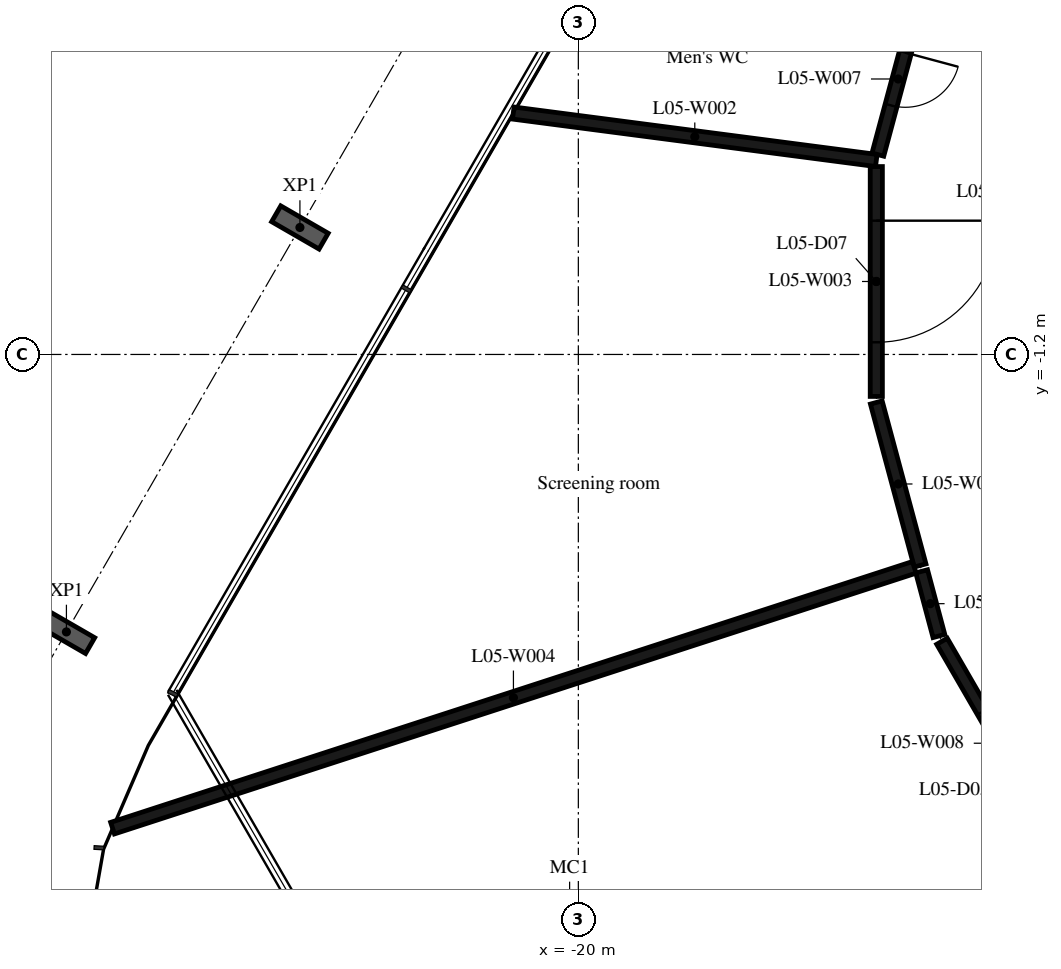
"""IFC4 building model, lengths in metres.
Left out: names, types, materials, properties, quantities, classifications, styles, units other than length and angle.
Written with IfcOpenShell. Run it as: python <this file> out.ifc"""

import sys

from ifc_helpers import new_model, si_unit, direction, frame, frame_2d, origin, origin_2d, place, context, subcontext, project, spatial, rectangle, i_section, extrude, element, fill, save


model = new_model("IFC4")
c1 = context("Model", 3, precision=1e-05, world=origin(), true_north=direction((0.0, 1.0)))
c2 = subcontext(c1, "Body", "Model", "MODEL_VIEW")
j1 = project(units=[si_unit("LENGTHUNIT", "METRE"), si_unit("PLANEANGLEUNIT", "RADIAN")], contexts=[c1])
p1 = place(None, origin())
s1 = spatial("IfcSite", under=j1, at=p1, CompositionType="ELEMENT")
p2 = place(p1, origin())
s2 = spatial("IfcBuilding", under=s1, at=p2, CompositionType="ELEMENT")
p3 = place(p2, frame((0.0, 0.0, 28.2)))
s3 = spatial("IfcBuildingStorey", under=s2, at=p3, CompositionType="ELEMENT", Elevation=28.2)
for number, where, z_axis, x_axis in (
    (1, (-24.579, 0.888, -0.38), (0.0, 0.0, 1.0), (0.5, 0.866, 0.0)),
    (2, (-28.419, -5.763, -0.38), (0.0, 0.0, 1.0), (0.5, 0.866, 0.0)),
):
    element("IfcColumn", number, at=place(p3, frame(where, z_axis=z_axis, x_axis=x_axis)), inside=s3, PredefinedType="COLUMN", context=c2, shape_type="SweptSolid", body=[
        extrude(i_section(OverallWidth=0.3, OverallDepth=0.9, WebThickness=0.019, FlangeThickness=0.035, FilletRadius=0.03, at=origin_2d()), origin(), (0.0, 0.0, 1.0), 4.73),
    ])
p4 = place(p3, frame((-15.1, -1.99, 0.0), z_axis=(0.0, 0.0, 1.0), x_axis=(0.259534891826, -0.96573373138, 0.0)))
e3 = element("IfcWall", 3, at=p4, inside=s3, PredefinedType="PARTITIONING", context=c2, shape_type="SweptSolid", body=[
    extrude(rectangle(XDim=2.775, YDim=0.2, at=frame_2d((1.387, 0.0))), origin(), (0.0, 0.0, 1.0), 4.35),
])
p5 = place(p3, frame((-15.1, 1.99, 0.0), z_axis=(0.0, 0.0, 1.0), x_axis=(-0.991571896529, 0.129557608858, 0.0)))
e4 = element("IfcWall", 4, at=p5, inside=s3, PredefinedType="PARTITIONING", context=c2, shape_type="SweptSolid", body=[
    extrude(rectangle(XDim=6.021, YDim=0.2, at=frame_2d((3.01, 0.0))), origin(), (0.0, 0.0, 1.0), 4.35),
])
p6 = place(p3, frame((-15.1, 1.89, 0.0), z_axis=(0.0, 0.0, 1.0), x_axis=(0.0, -1.0, 0.0)))
e5 = element("IfcWall", 5, at=p6, inside=s3, PredefinedType="PARTITIONING", context=c2, shape_type="SweptSolid", body=[
    extrude(rectangle(XDim=3.78, YDim=0.2, at=frame_2d((1.89, 0.0))), origin(), (0.0, 0.0, 1.0), 4.35),
])
p7 = place(p6, frame((0.89, 0.0, 0.0)))
e6 = element("IfcOpeningElement", 6, at=p7, cuts=e5, PredefinedType="OPENING", context=c2, shape_type="SweptSolid", body=[
    extrude(rectangle(XDim=2.0, YDim=2.1, at=frame_2d((1.0, 1.05))), frame((0.0, 0.11, 0.0), z_axis=(0.0, -1.0, 0.0), x_axis=(1.0, 0.0, 0.0)), (0.0, 0.0, 1.0), 0.22),
])
p8 = place(p3, frame((-14.475, -4.701, 0.0), z_axis=(0.0, 0.0, 1.0), x_axis=(-0.950949275071, -0.309346854262, 0.0)))
e7 = element("IfcWall", 7, at=p8, inside=s3, PredefinedType="PARTITIONING", context=c2, shape_type="SweptSolid", body=[
    extrude(rectangle(XDim=13.865, YDim=0.2, at=frame_2d((6.933, 0.0))), origin(), (0.0, 0.0, 1.0), 4.35),
])
p9 = place(p3, frame((-14.354, -4.767, 0.0), z_axis=(0.0, 0.0, 1.0), x_axis=(0.258159565639, -0.966102292032, 0.0)))
e8 = element("IfcWall", 8, at=p9, inside=s3, PredefinedType="PARTITIONING", context=c2, shape_type="SweptSolid", body=[
    extrude(rectangle(XDim=1.101, YDim=0.2, at=frame_2d((0.55, 0.0))), origin(), (0.0, 0.0, 1.0), 4.35),
])
p10 = place(p3, frame((-14.406, 4.573, 0.0), z_axis=(0.0, 0.0, 1.0), x_axis=(-0.259408996071, -0.965767556277, 0.0)))
e9 = element("IfcWall", 9, at=p10, inside=s3, PredefinedType="PARTITIONING", context=c2, shape_type="SweptSolid", body=[
    extrude(rectangle(XDim=2.575, YDim=0.2, at=frame_2d((1.288, 0.0))), origin(), (0.0, 0.0, 1.0), 4.35),
])
p11 = place(p10, frame((0.837, 0.0, 0.0)))
e10 = element("IfcOpeningElement", 10, at=p11, cuts=e9, PredefinedType="OPENING", context=c2, shape_type="SweptSolid", body=[
    extrude(rectangle(XDim=0.9, YDim=2.1, at=frame_2d((0.45, 1.05))), frame((0.0, 0.11, 0.0), z_axis=(0.0, -1.0, 0.0), x_axis=(1.0, 0.0, 0.0)), (0.0, 0.0, 1.0), 0.22),
])
p12 = place(p3, frame((-14.02, -5.917, 0.0), z_axis=(0.0, 0.0, 1.0), x_axis=(0.500733182901, -0.865601686425, 0.0)))
e11 = element("IfcWall", 11, at=p12, inside=s3, PredefinedType="PARTITIONING", context=c2, shape_type="SweptSolid", body=[
    extrude(rectangle(XDim=3.874, YDim=0.2, at=frame_2d((1.937, 0.0))), origin(), (0.0, 0.0, 1.0), 4.35),
])
p13 = place(p12, frame((1.337, 0.0, 0.0)))
e12 = element("IfcOpeningElement", 12, at=p13, cuts=e11, PredefinedType="OPENING", context=c2, shape_type="SweptSolid", body=[
    extrude(rectangle(XDim=1.2, YDim=2.1, at=frame_2d((0.6, 1.05))), frame((0.0, 0.11, 0.0), z_axis=(0.0, -1.0, 0.0), x_axis=(1.0, 0.0, 0.0)), (0.0, 0.0, 1.0), 0.22),
])
p14 = place(p7, origin())
e13 = element("IfcDoor", 13, at=p14, inside=s3, OperationType="DOUBLE_DOOR_SINGLE_SWING", PredefinedType="DOOR", context=c2, shape_type="SweptSolid", body=[
    extrude(rectangle(XDim=2.0, YDim=2.1, at=frame_2d((1.0, 1.05))), frame((0.0, 0.025, 0.0), z_axis=(0.0, -1.0, 0.0), x_axis=(1.0, 0.0, 0.0)), (0.0, 0.0, 1.0), 0.05),
])
fill(e6, e13)
p15 = place(p11, origin())
e14 = element("IfcDoor", 14, at=p15, inside=s3, OperationType="SINGLE_SWING_LEFT", PredefinedType="DOOR", context=c2, shape_type="SweptSolid", body=[
    extrude(rectangle(XDim=0.9, YDim=2.1, at=frame_2d((0.45, 1.05))), frame((0.0, 0.025, 0.0), z_axis=(0.0, -1.0, 0.0), x_axis=(1.0, 0.0, 0.0)), (0.0, 0.0, 1.0), 0.05),
])
fill(e10, e14)
save(model, sys.argv[1])
